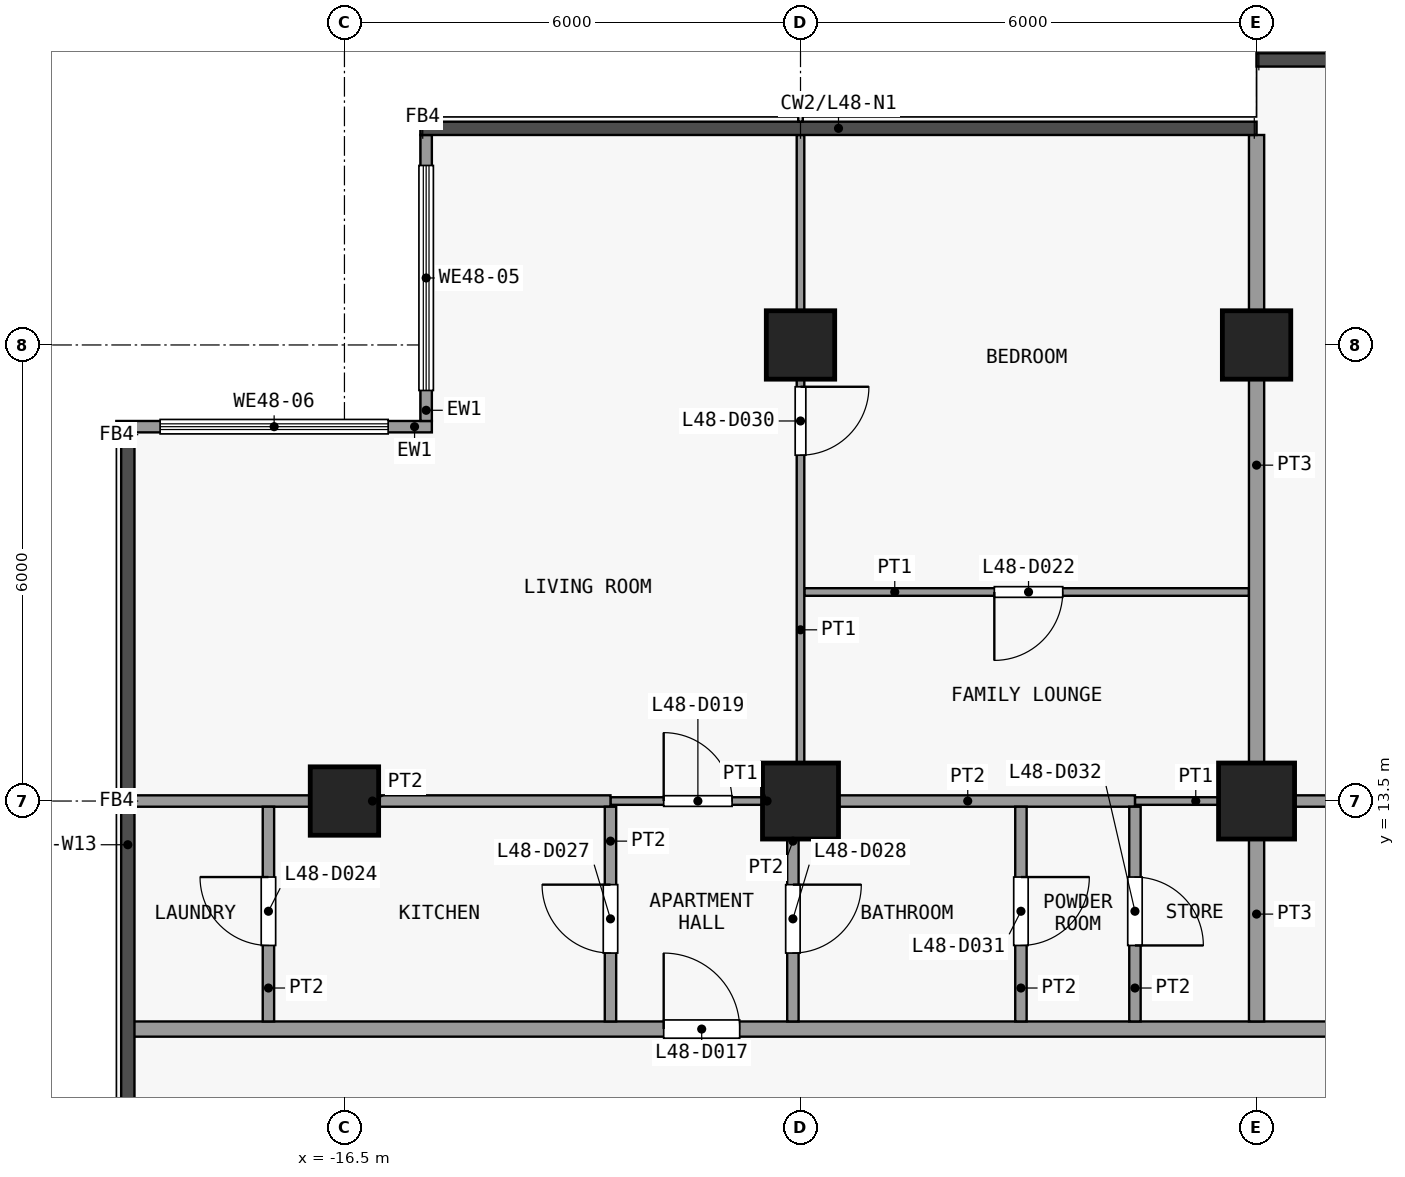
"""IFC4 building model, lengths in metres.
Left out: names, types, materials, properties, quantities, classifications, styles, units other than length and angle.
Written with IfcOpenShell. Run it as: python <this file> out.ifc"""

import sys

from ifc_helpers import new_model, si_unit, direction, frame, frame_2d, origin, origin_2d, place, context, subcontext, project, spatial, rectangle, extrude, element, fill, save


model = new_model("IFC4")
c1 = context("Model", 3, precision=1e-05, world=origin(), true_north=direction((0.0, 1.0)))
c2 = subcontext(c1, "Body", "Model", "MODEL_VIEW")
j1 = project(units=[si_unit("LENGTHUNIT", "METRE"), si_unit("PLANEANGLEUNIT", "RADIAN")], contexts=[c1])
p1 = place(None, origin())
s1 = spatial("IfcSite", under=j1, at=p1, CompositionType="ELEMENT")
p2 = place(p1, origin())
s2 = spatial("IfcBuilding", under=s1, at=p2, CompositionType="ELEMENT")
p3 = place(p2, frame((0.0, 0.0, 192.5)))
s3 = spatial("IfcBuildingStorey", under=s2, at=p3, CompositionType="ELEMENT", Elevation=192.5)
p4 = place(p3, frame((-16.5, 13.5, 0.0), z_axis=(0.0, 0.0, 1.0), x_axis=(1.0, 0.0, 0.0)))
e1 = element("IfcColumn", 1, at=p4, inside=s3, PredefinedType="COLUMN", context=c2, shape_type="SweptSolid", body=[
    extrude(rectangle(XDim=0.9, YDim=0.9, at=origin_2d()), origin(), (0.0, 0.0, 1.0), 3.6),
])
p5 = place(p3, frame((-10.5, 13.5, 0.0), z_axis=(0.0, 0.0, 1.0), x_axis=(1.0, 0.0, 0.0)))
e2 = element("IfcColumn", 2, at=p5, inside=s3, PredefinedType="COLUMN", context=c2, shape_type="SweptSolid", body=[
    extrude(rectangle(XDim=1.0, YDim=1.0, at=origin_2d()), origin(), (0.0, 0.0, 1.0), 3.6),
])
p6 = place(p3, frame((-10.5, 19.5, 0.0), z_axis=(0.0, 0.0, 1.0), x_axis=(1.0, 0.0, 0.0)))
e3 = element("IfcColumn", 3, at=p6, inside=s3, PredefinedType="COLUMN", context=c2, shape_type="SweptSolid", body=[
    extrude(rectangle(XDim=0.9, YDim=0.9, at=origin_2d()), origin(), (0.0, 0.0, 1.0), 3.6),
])
p7 = place(p3, frame((-4.5, 13.5, 0.0), z_axis=(0.0, 0.0, 1.0), x_axis=(1.0, 0.0, 0.0)))
e4 = element("IfcColumn", 4, at=p7, inside=s3, PredefinedType="COLUMN", context=c2, shape_type="SweptSolid", body=[
    extrude(rectangle(XDim=1.0, YDim=1.0, at=origin_2d()), origin(), (0.0, 0.0, 1.0), 3.6),
])
p8 = place(p3, frame((-4.5, 19.5, 0.0), z_axis=(0.0, 0.0, 1.0), x_axis=(1.0, 0.0, 0.0)))
e5 = element("IfcColumn", 5, at=p8, inside=s3, PredefinedType="COLUMN", context=c2, shape_type="SweptSolid", body=[
    extrude(rectangle(XDim=0.9, YDim=0.9, at=origin_2d()), origin(), (0.0, 0.0, 1.0), 3.6),
])
p9 = place(p3, frame((-15.425, 18.5, 0.0), z_axis=(0.0, 0.0, 1.0), x_axis=(0.0, 1.0, 0.0)))
e6 = element("IfcWall", 6, at=p9, inside=s3, PredefinedType="SOLIDWALL", context=c2, shape_type="SweptSolid", body=[
    extrude(rectangle(XDim=3.762, YDim=0.15, at=frame_2d((1.881, 0.0))), origin(), (0.0, 0.0, 1.0), 3.3),
])
p10 = place(p9, frame((0.401, 0.0, 0.9)))
e7 = element("IfcOpeningElement", 7, at=p10, cuts=e6, PredefinedType="OPENING", context=c2, shape_type="SweptSolid", body=[
    extrude(rectangle(XDim=2.96, YDim=2.4, at=frame_2d((1.48, 1.2))), frame((0.0, 0.085, 0.0), z_axis=(0.0, -1.0, 0.0), x_axis=(1.0, 0.0, 0.0)), (0.0, 0.0, 1.0), 0.17),
])
p11 = place(p3, frame((-19.5, 18.425, 0.0), z_axis=(0.0, 0.0, 1.0), x_axis=(1.0, 0.0, 0.0)))
e8 = element("IfcWall", 8, at=p11, inside=s3, PredefinedType="SOLIDWALL", context=c2, shape_type="SweptSolid", body=[
    extrude(rectangle(XDim=4.15, YDim=0.15, at=frame_2d((2.075, 0.0))), origin(), (0.0, 0.0, 1.0), 3.3),
])
p12 = place(p11, frame((0.575, 0.0, 0.9)))
e9 = element("IfcOpeningElement", 9, at=p12, cuts=e8, PredefinedType="OPENING", context=c2, shape_type="SweptSolid", body=[
    extrude(rectangle(XDim=3.0, YDim=2.4, at=frame_2d((1.5, 1.2))), frame((0.0, 0.085, 0.0), z_axis=(0.0, -1.0, 0.0), x_axis=(1.0, 0.0, 0.0)), (0.0, 0.0, 1.0), 0.17),
])
p13 = place(p3, frame((-19.35, 10.5, 0.0), z_axis=(0.0, 0.0, 1.0), x_axis=(1.0, 0.0, 0.0)))
e10 = element("IfcWall", 10, at=p13, inside=s3, PredefinedType="PARTITIONING", context=c2, shape_type="SweptSolid", body=[
    extrude(rectangle(XDim=37.2, YDim=0.2, at=frame_2d((18.6, 0.0))), origin(), (0.0, 0.0, 1.0), 3.3),
])
p14 = place(p13, frame((7.05, 0.0, 0.0)))
e11 = element("IfcOpeningElement", 11, at=p14, cuts=e10, PredefinedType="OPENING", context=c2, shape_type="SweptSolid", body=[
    extrude(rectangle(XDim=1.0, YDim=2.1, at=frame_2d((0.5, 1.05))), frame((0.0, 0.11, 0.0), z_axis=(0.0, -1.0, 0.0), x_axis=(1.0, 0.0, 0.0)), (0.0, 0.0, 1.0), 0.22),
])
p15 = place(p13, frame((18.05, 0.0, 0.0)))
e12 = element("IfcOpeningElement", 12, at=p15, cuts=e10, PredefinedType="OPENING", context=c2, shape_type="SweptSolid", body=[
    extrude(rectangle(XDim=1.0, YDim=2.1, at=frame_2d((0.5, 1.05))), frame((0.0, 0.11, 0.0), z_axis=(0.0, -1.0, 0.0), x_axis=(1.0, 0.0, 0.0)), (0.0, 0.0, 1.0), 0.22),
])
p16 = place(p3, frame((-13.0, 13.5, 0.0), z_axis=(0.0, 0.0, 1.0), x_axis=(1.0, 0.0, 0.0)))
e13 = element("IfcWall", 13, at=p16, inside=s3, PredefinedType="PARTITIONING", context=c2, shape_type="SweptSolid", body=[
    extrude(rectangle(XDim=2.4, YDim=0.1, at=frame_2d((1.2, 0.0))), origin(), (0.0, 0.0, 1.0), 3.3),
])
p17 = place(p16, frame((0.7, 0.0, 0.0)))
e14 = element("IfcOpeningElement", 14, at=p17, cuts=e13, PredefinedType="OPENING", context=c2, shape_type="SweptSolid", body=[
    extrude(rectangle(XDim=0.9, YDim=2.1, at=frame_2d((0.45, 1.05))), frame((0.0, 0.06, 0.0), z_axis=(0.0, -1.0, 0.0), x_axis=(1.0, 0.0, 0.0)), (0.0, 0.0, 1.0), 0.12),
])
p18 = place(p3, frame((-6.1, 13.5, 0.0), z_axis=(0.0, 0.0, 1.0), x_axis=(1.0, 0.0, 0.0)))
e15 = element("IfcWall", 15, at=p18, inside=s3, PredefinedType="PARTITIONING", context=c2, shape_type="SweptSolid", body=[
    extrude(rectangle(XDim=1.6, YDim=0.1, at=frame_2d((0.8, 0.0))), origin(), (0.0, 0.0, 1.0), 3.3),
])
p19 = place(p3, frame((-19.262, 13.5, 0.0), z_axis=(0.0, 0.0, 1.0), x_axis=(1.0, 0.0, 0.0)))
e16 = element("IfcWall", 16, at=p19, inside=s3, PredefinedType="PARTITIONING", context=c2, shape_type="SweptSolid", body=[
    extrude(rectangle(XDim=6.262, YDim=0.15, at=frame_2d((3.131, 0.0))), origin(), (0.0, 0.0, 1.0), 3.3),
])
p20 = place(p3, frame((-10.5, 13.5, 0.0), z_axis=(0.0, 0.0, 1.0), x_axis=(1.0, 0.0, 0.0)))
e17 = element("IfcWall", 17, at=p20, inside=s3, PredefinedType="PARTITIONING", context=c2, shape_type="SweptSolid", body=[
    extrude(rectangle(XDim=4.4, YDim=0.15, at=frame_2d((2.2, 0.0))), origin(), (0.0, 0.0, 1.0), 3.3),
])
p21 = place(p3, frame((-4.5, 13.5, 0.0), z_axis=(0.0, 0.0, 1.0), x_axis=(1.0, 0.0, 0.0)))
e18 = element("IfcWall", 18, at=p21, inside=s3, PredefinedType="PARTITIONING", context=c2, shape_type="SweptSolid", body=[
    extrude(rectangle(XDim=2.5, YDim=0.15, at=frame_2d((1.25, 0.0))), origin(), (0.0, 0.0, 1.0), 3.3),
])
p22 = place(p3, frame((-10.45, 16.25, 0.0), z_axis=(0.0, 0.0, 1.0), x_axis=(1.0, 0.0, 0.0)))
e19 = element("IfcWall", 19, at=p22, inside=s3, PredefinedType="PARTITIONING", context=c2, shape_type="SweptSolid", body=[
    extrude(rectangle(XDim=5.85, YDim=0.1, at=frame_2d((2.925, 0.0))), origin(), (0.0, 0.0, 1.0), 3.3),
])
p23 = place(p22, frame((2.5, 0.0, 0.0)))
e20 = element("IfcOpeningElement", 20, at=p23, cuts=e19, PredefinedType="OPENING", context=c2, shape_type="SweptSolid", body=[
    extrude(rectangle(XDim=0.9, YDim=2.1, at=frame_2d((0.45, 1.05))), frame((0.0, 0.06, 0.0), z_axis=(0.0, -1.0, 0.0), x_axis=(1.0, 0.0, 0.0)), (0.0, 0.0, 1.0), 0.12),
])
p24 = place(p3, frame((-17.5, 10.6, 0.0), z_axis=(0.0, 0.0, 1.0), x_axis=(0.0, 1.0, 0.0)))
e21 = element("IfcWall", 21, at=p24, inside=s3, PredefinedType="PARTITIONING", context=c2, shape_type="SweptSolid", body=[
    extrude(rectangle(XDim=2.825, YDim=0.15, at=frame_2d((1.413, 0.0))), origin(), (0.0, 0.0, 1.0), 3.3),
])
p25 = place(p24, frame((1.0, 0.0, 0.0)))
e22 = element("IfcOpeningElement", 22, at=p25, cuts=e21, PredefinedType="OPENING", context=c2, shape_type="SweptSolid", body=[
    extrude(rectangle(XDim=0.9, YDim=2.1, at=frame_2d((0.45, 1.05))), frame((0.0, 0.085, 0.0), z_axis=(0.0, -1.0, 0.0), x_axis=(1.0, 0.0, 0.0)), (0.0, 0.0, 1.0), 0.17),
])
p26 = place(p3, frame((-13.0, 10.6, 0.0), z_axis=(0.0, 0.0, 1.0), x_axis=(0.0, 1.0, 0.0)))
e23 = element("IfcWall", 23, at=p26, inside=s3, PredefinedType="PARTITIONING", context=c2, shape_type="SweptSolid", body=[
    extrude(rectangle(XDim=2.825, YDim=0.15, at=frame_2d((1.413, 0.0))), origin(), (0.0, 0.0, 1.0), 3.3),
])
p27 = place(p26, frame((0.9, 0.0, 0.0)))
e24 = element("IfcOpeningElement", 24, at=p27, cuts=e23, PredefinedType="OPENING", context=c2, shape_type="SweptSolid", body=[
    extrude(rectangle(XDim=0.9, YDim=2.1, at=frame_2d((0.45, 1.05))), frame((0.0, 0.085, 0.0), z_axis=(0.0, -1.0, 0.0), x_axis=(1.0, 0.0, 0.0)), (0.0, 0.0, 1.0), 0.17),
])
p28 = place(p3, frame((-10.6, 10.6, 0.0), z_axis=(0.0, 0.0, 1.0), x_axis=(0.0, 1.0, 0.0)))
e25 = element("IfcWall", 25, at=p28, inside=s3, PredefinedType="PARTITIONING", context=c2, shape_type="SweptSolid", body=[
    extrude(rectangle(XDim=2.825, YDim=0.15, at=frame_2d((1.413, 0.0))), origin(), (0.0, 0.0, 1.0), 3.3),
])
p29 = place(p28, frame((0.9, 0.0, 0.0)))
e26 = element("IfcOpeningElement", 26, at=p29, cuts=e25, PredefinedType="OPENING", context=c2, shape_type="SweptSolid", body=[
    extrude(rectangle(XDim=0.9, YDim=2.1, at=frame_2d((0.45, 1.05))), frame((0.0, 0.085, 0.0), z_axis=(0.0, -1.0, 0.0), x_axis=(1.0, 0.0, 0.0)), (0.0, 0.0, 1.0), 0.17),
])
p30 = place(p3, frame((-10.5, 13.575, 0.0), z_axis=(0.0, 0.0, 1.0), x_axis=(0.0, 1.0, 0.0)))
e27 = element("IfcWall", 27, at=p30, inside=s3, PredefinedType="PARTITIONING", context=c2, shape_type="SweptSolid", body=[
    extrude(rectangle(XDim=8.688, YDim=0.1, at=frame_2d((4.344, 0.0))), origin(), (0.0, 0.0, 1.0), 3.3),
])
p31 = place(p30, frame((4.475, 0.0, 0.0)))
e28 = element("IfcOpeningElement", 28, at=p31, cuts=e27, PredefinedType="OPENING", context=c2, shape_type="SweptSolid", body=[
    extrude(rectangle(XDim=0.9, YDim=2.1, at=frame_2d((0.45, 1.05))), frame((0.0, 0.06, 0.0), z_axis=(0.0, -1.0, 0.0), x_axis=(1.0, 0.0, 0.0)), (0.0, 0.0, 1.0), 0.12),
])
p32 = place(p3, frame((-7.6, 10.6, 0.0), z_axis=(0.0, 0.0, 1.0), x_axis=(0.0, 1.0, 0.0)))
e29 = element("IfcWall", 29, at=p32, inside=s3, PredefinedType="PARTITIONING", context=c2, shape_type="SweptSolid", body=[
    extrude(rectangle(XDim=2.825, YDim=0.15, at=frame_2d((1.413, 0.0))), origin(), (0.0, 0.0, 1.0), 3.3),
])
p33 = place(p32, frame((1.0, 0.0, 0.0)))
e30 = element("IfcOpeningElement", 30, at=p33, cuts=e29, PredefinedType="OPENING", context=c2, shape_type="SweptSolid", body=[
    extrude(rectangle(XDim=0.9, YDim=2.1, at=frame_2d((0.45, 1.05))), frame((0.0, 0.085, 0.0), z_axis=(0.0, -1.0, 0.0), x_axis=(1.0, 0.0, 0.0)), (0.0, 0.0, 1.0), 0.17),
])
p34 = place(p3, frame((-6.1, 10.6, 0.0), z_axis=(0.0, 0.0, 1.0), x_axis=(0.0, 1.0, 0.0)))
e31 = element("IfcWall", 31, at=p34, inside=s3, PredefinedType="PARTITIONING", context=c2, shape_type="SweptSolid", body=[
    extrude(rectangle(XDim=2.825, YDim=0.15, at=frame_2d((1.413, 0.0))), origin(), (0.0, 0.0, 1.0), 3.3),
])
p35 = place(p34, frame((1.0, 0.0, 0.0)))
e32 = element("IfcOpeningElement", 32, at=p35, cuts=e31, PredefinedType="OPENING", context=c2, shape_type="SweptSolid", body=[
    extrude(rectangle(XDim=0.9, YDim=2.1, at=frame_2d((0.45, 1.05))), frame((0.0, 0.085, 0.0), z_axis=(0.0, -1.0, 0.0), x_axis=(1.0, 0.0, 0.0)), (0.0, 0.0, 1.0), 0.17),
])
p36 = place(p3, frame((-4.5, 10.6, 0.0), z_axis=(0.0, 0.0, 1.0), x_axis=(0.0, 1.0, 0.0)))
e33 = element("IfcWall", 33, at=p36, inside=s3, PredefinedType="PARTITIONING", context=c2, shape_type="SweptSolid", body=[
    extrude(rectangle(XDim=2.825, YDim=0.2, at=frame_2d((1.413, 0.0))), origin(), (0.0, 0.0, 1.0), 3.3),
])
p37 = place(p3, frame((-4.5, 13.575, 0.0), z_axis=(0.0, 0.0, 1.0), x_axis=(0.0, 1.0, 0.0)))
e34 = element("IfcWall", 34, at=p37, inside=s3, PredefinedType="PARTITIONING", context=c2, shape_type="SweptSolid", body=[
    extrude(rectangle(XDim=8.688, YDim=0.2, at=frame_2d((4.344, 0.0))), origin(), (0.0, 0.0, 1.0), 3.3),
])
p38 = place(p10, origin())
e35 = element("IfcWindow", 35, at=p38, inside=s3, PartitioningType="SINGLE_PANEL", PredefinedType="WINDOW", context=c2, shape_type="SweptSolid", body=[
    extrude(rectangle(XDim=2.96, YDim=2.4, at=frame_2d((1.48, 1.2))), frame((0.0, 0.03, 0.0), z_axis=(0.0, -1.0, 0.0), x_axis=(1.0, 0.0, 0.0)), (0.0, 0.0, 1.0), 0.06),
])
fill(e7, e35)
p39 = place(p12, origin())
e36 = element("IfcWindow", 36, at=p39, inside=s3, PartitioningType="SINGLE_PANEL", PredefinedType="WINDOW", context=c2, shape_type="SweptSolid", body=[
    extrude(rectangle(XDim=3.0, YDim=2.4, at=frame_2d((1.5, 1.2))), frame((0.0, 0.03, 0.0), z_axis=(0.0, -1.0, 0.0), x_axis=(1.0, 0.0, 0.0)), (0.0, 0.0, 1.0), 0.06),
])
fill(e9, e36)
p40 = place(p14, origin())
e37 = element("IfcDoor", 37, at=p40, inside=s3, OperationType="SINGLE_SWING_RIGHT", PredefinedType="DOOR", context=c2, shape_type="SweptSolid", body=[
    extrude(rectangle(XDim=1.0, YDim=2.1, at=frame_2d((0.5, 1.05))), frame((0.0, 0.025, 0.0), z_axis=(0.0, -1.0, 0.0), x_axis=(1.0, 0.0, 0.0)), (0.0, 0.0, 1.0), 0.05),
])
fill(e11, e37)
p41 = place(p17, origin())
e38 = element("IfcDoor", 38, at=p41, inside=s3, OperationType="SINGLE_SWING_RIGHT", PredefinedType="DOOR", context=c2, shape_type="SweptSolid", body=[
    extrude(rectangle(XDim=0.9, YDim=2.1, at=frame_2d((0.45, 1.05))), frame((0.0, 0.025, 0.0), z_axis=(0.0, -1.0, 0.0), x_axis=(1.0, 0.0, 0.0)), (0.0, 0.0, 1.0), 0.05),
])
fill(e14, e38)
p42 = place(p23, origin())
e39 = element("IfcDoor", 39, at=p42, inside=s3, OperationType="SINGLE_SWING_LEFT", PredefinedType="DOOR", context=c2, shape_type="SweptSolid", body=[
    extrude(rectangle(XDim=0.9, YDim=2.1, at=frame_2d((0.45, 1.05))), frame((0.0, 0.025, 0.0), z_axis=(0.0, -1.0, 0.0), x_axis=(1.0, 0.0, 0.0)), (0.0, 0.0, 1.0), 0.05),
])
fill(e20, e39)
p43 = place(p25, origin())
e40 = element("IfcDoor", 40, at=p43, inside=s3, OperationType="SINGLE_SWING_LEFT", PredefinedType="DOOR", context=c2, shape_type="SweptSolid", body=[
    extrude(rectangle(XDim=0.9, YDim=2.1, at=frame_2d((0.45, 1.05))), frame((0.0, 0.025, 0.0), z_axis=(0.0, -1.0, 0.0), x_axis=(1.0, 0.0, 0.0)), (0.0, 0.0, 1.0), 0.05),
])
fill(e22, e40)
p44 = place(p27, origin())
e41 = element("IfcDoor", 41, at=p44, inside=s3, OperationType="SINGLE_SWING_LEFT", PredefinedType="DOOR", context=c2, shape_type="SweptSolid", body=[
    extrude(rectangle(XDim=0.9, YDim=2.1, at=frame_2d((0.45, 1.05))), frame((0.0, 0.025, 0.0), z_axis=(0.0, -1.0, 0.0), x_axis=(1.0, 0.0, 0.0)), (0.0, 0.0, 1.0), 0.05),
])
fill(e24, e41)
p45 = place(p29, origin())
e42 = element("IfcDoor", 42, at=p45, inside=s3, OperationType="SINGLE_SWING_RIGHT", PredefinedType="DOOR", context=c2, shape_type="SweptSolid", body=[
    extrude(rectangle(XDim=0.9, YDim=2.1, at=frame_2d((0.45, 1.05))), frame((0.0, 0.025, 0.0), z_axis=(0.0, -1.0, 0.0), x_axis=(1.0, 0.0, 0.0)), (0.0, 0.0, 1.0), 0.05),
])
fill(e26, e42)
p46 = place(p31, origin())
e43 = element("IfcDoor", 43, at=p46, inside=s3, OperationType="SINGLE_SWING_RIGHT", PredefinedType="DOOR", context=c2, shape_type="SweptSolid", body=[
    extrude(rectangle(XDim=0.9, YDim=2.1, at=frame_2d((0.45, 1.05))), frame((0.0, 0.025, 0.0), z_axis=(0.0, -1.0, 0.0), x_axis=(1.0, 0.0, 0.0)), (0.0, 0.0, 1.0), 0.05),
])
fill(e28, e43)
p47 = place(p33, origin())
e44 = element("IfcDoor", 44, at=p47, inside=s3, OperationType="SINGLE_SWING_RIGHT", PredefinedType="DOOR", context=c2, shape_type="SweptSolid", body=[
    extrude(rectangle(XDim=0.9, YDim=2.1, at=frame_2d((0.45, 1.05))), frame((0.0, 0.025, 0.0), z_axis=(0.0, -1.0, 0.0), x_axis=(1.0, 0.0, 0.0)), (0.0, 0.0, 1.0), 0.05),
])
fill(e30, e44)
p48 = place(p35, origin())
e45 = element("IfcDoor", 45, at=p48, inside=s3, OperationType="SINGLE_SWING_LEFT", PredefinedType="DOOR", context=c2, shape_type="SweptSolid", body=[
    extrude(rectangle(XDim=0.9, YDim=2.1, at=frame_2d((0.45, 1.05))), frame((0.0, 0.025, 0.0), z_axis=(0.0, -1.0, 0.0), x_axis=(1.0, 0.0, 0.0)), (0.0, 0.0, 1.0), 0.05),
])
fill(e32, e45)
save(model, sys.argv[1])
